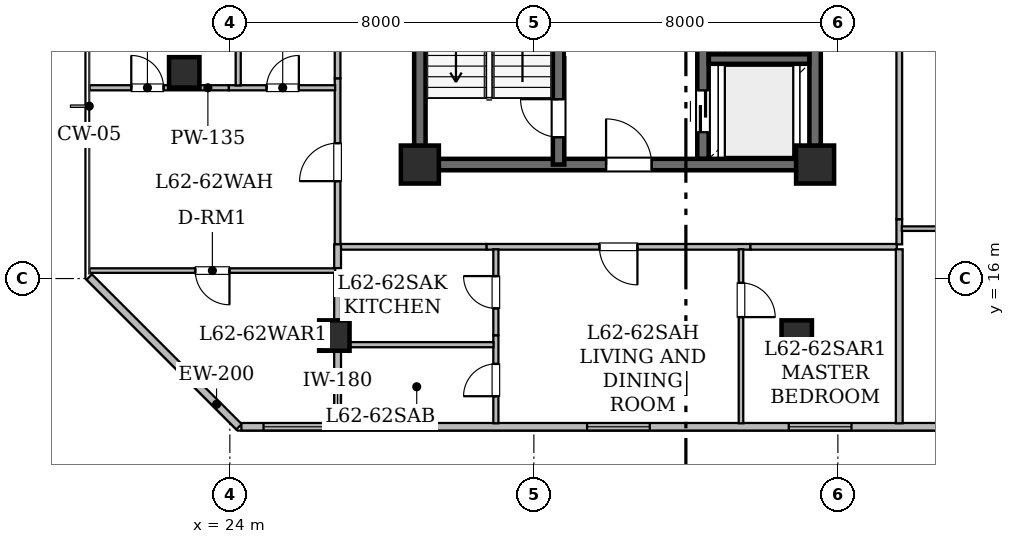
"""IFC4 building model, lengths in metres.
Left out: names, types, materials, properties, quantities, classifications, styles, units other than length and angle.
Written with IfcOpenShell. Run it as: python <this file> out.ifc"""

import sys

from ifc_helpers import new_model, si_unit, direction, frame, frame_2d, origin, origin_2d, place, context, subcontext, project, spatial, rectangle, hollow_rectangle, extrude, element, fill, save


model = new_model("IFC4")
c1 = context("Model", 3, precision=1e-05, world=origin(), true_north=direction((0.0, 1.0)))
c2 = subcontext(c1, "Body", "Model", "MODEL_VIEW")
j1 = project(units=[si_unit("LENGTHUNIT", "METRE"), si_unit("PLANEANGLEUNIT", "RADIAN")], contexts=[c1])
p1 = place(None, origin())
s1 = spatial("IfcSite", under=j1, at=p1, CompositionType="ELEMENT")
p2 = place(p1, origin())
s2 = spatial("IfcBuilding", under=s1, at=p2, CompositionType="ELEMENT")
p3 = place(p2, frame((0.0, 0.0, 242.75)))
s3 = spatial("IfcBuildingStorey", under=s2, at=p3, CompositionType="ELEMENT", Elevation=242.75)
for number, where, z_axis, x_axis in (
    (1, (29.0, 19.0, 0.0), (0.0, 0.0, 1.0), (1.0, 0.0, 0.0)),
    (2, (39.4, 19.0, 0.0), (0.0, 0.0, 1.0), (1.0, 0.0, 0.0)),
):
    element("IfcColumn", number, at=place(p3, frame(where, z_axis=z_axis, x_axis=x_axis)), inside=s3, PredefinedType="COLUMN", context=c2, shape_type="SweptSolid", body=[
        extrude(hollow_rectangle(XDim=1.0, YDim=1.0, WallThickness=0.05, at=origin_2d()), origin(), (0.0, 0.0, 1.0), 3.65),
    ])
for number, where, z_axis, x_axis in (
    (3, (26.75, 14.5, 0.0), (0.0, 0.0, 1.0), (1.0, 0.0, 0.0)),
    (4, (38.917, 14.5, 0.0), (0.0, 0.0, 1.0), (1.0, 0.0, 0.0)),
    (5, (22.8, 21.425, 0.0), (0.0, 0.0, 1.0), (1.0, 0.0, 0.0)),
):
    element("IfcColumn", number, at=place(p3, frame(where, z_axis=z_axis, x_axis=x_axis)), inside=s3, PredefinedType="COLUMN", context=c2, shape_type="SweptSolid", body=[
        extrude(hollow_rectangle(XDim=0.8, YDim=0.8, WallThickness=0.04, at=origin_2d()), origin(), (0.0, 0.0, 1.0), 3.65),
    ])
p4 = place(p3, frame((24.241, 12.1, 0.0), z_axis=(0.0, 0.0, 1.0), x_axis=(-0.707106781187, 0.707106781187, 0.0)))
e6 = element("IfcWall", 6, at=p4, inside=s3, PredefinedType="STANDARD", context=c2, shape_type="SweptSolid", body=[
    extrude(rectangle(XDim=5.573, YDim=0.2, at=frame_2d((2.787, 0.0))), origin(), (0.0, 0.0, 1.0), 3.43),
])
p5 = place(p3, frame((65.696, 12.1, 0.0), z_axis=(0.0, 0.0, 1.0), x_axis=(-1.0, 0.0, 0.0)))
e7 = element("IfcWall", 7, at=p5, inside=s3, PredefinedType="STANDARD", context=c2, shape_type="SweptSolid", body=[
    extrude(rectangle(XDim=41.393, YDim=0.2, at=frame_2d((20.697, 0.0))), origin(), (0.0, 0.0, 1.0), 3.43),
])
p6 = place(p5, frame((39.16, 0.0, 0.85)))
e8 = element("IfcOpeningElement", 8, at=p6, cuts=e7, PredefinedType="OPENING", context=c2, shape_type="SweptSolid", body=[
    extrude(rectangle(XDim=1.65, YDim=1.55, at=frame_2d((0.825, 0.775))), frame((0.0, 0.11, 0.0), z_axis=(0.0, -1.0, 0.0), x_axis=(1.0, 0.0, 0.0)), (0.0, 0.0, 1.0), 0.22),
])
p7 = place(p5, frame((30.646, 0.0, 0.85)))
e9 = element("IfcOpeningElement", 9, at=p7, cuts=e7, PredefinedType="OPENING", context=c2, shape_type="SweptSolid", body=[
    extrude(rectangle(XDim=1.65, YDim=1.55, at=frame_2d((0.825, 0.775))), frame((0.0, 0.11, 0.0), z_axis=(0.0, -1.0, 0.0), x_axis=(1.0, 0.0, 0.0)), (0.0, 0.0, 1.0), 0.22),
])
p8 = place(p5, frame((25.339, 0.0, 0.85)))
e10 = element("IfcOpeningElement", 10, at=p8, cuts=e7, PredefinedType="OPENING", context=c2, shape_type="SweptSolid", body=[
    extrude(rectangle(XDim=1.65, YDim=1.55, at=frame_2d((0.825, 0.775))), frame((0.0, 0.11, 0.0), z_axis=(0.0, -1.0, 0.0), x_axis=(1.0, 0.0, 0.0)), (0.0, 0.0, 1.0), 0.22),
])
p9 = place(p5, frame((15.596, 0.0, 0.8)))
e11 = element("IfcOpeningElement", 11, at=p9, cuts=e7, PredefinedType="OPENING", context=c2, shape_type="SweptSolid", body=[
    extrude(rectangle(XDim=1.2, YDim=1.5, at=frame_2d((0.6, 0.75))), frame((0.0, 0.11, 0.0), z_axis=(0.0, -1.0, 0.0), x_axis=(1.0, 0.0, 0.0)), (0.0, 0.0, 1.0), 0.22),
])
p10 = place(p5, frame((19.706, 0.0, 0.85)))
e12 = element("IfcOpeningElement", 12, at=p10, cuts=e7, PredefinedType="OPENING", context=c2, shape_type="SweptSolid", body=[
    extrude(rectangle(XDim=1.65, YDim=1.55, at=frame_2d((0.825, 0.775))), frame((0.0, 0.11, 0.0), z_axis=(0.0, -1.0, 0.0), x_axis=(1.0, 0.0, 0.0)), (0.0, 0.0, 1.0), 0.22),
])
p11 = place(p5, frame((11.036, 0.0, 0.85)))
e13 = element("IfcOpeningElement", 13, at=p11, cuts=e7, PredefinedType="OPENING", context=c2, shape_type="SweptSolid", body=[
    extrude(rectangle(XDim=1.65, YDim=1.55, at=frame_2d((0.825, 0.775))), frame((0.0, 0.11, 0.0), z_axis=(0.0, -1.0, 0.0), x_axis=(1.0, 0.0, 0.0)), (0.0, 0.0, 1.0), 0.22),
])
p12 = place(p5, frame((1.526, 0.0, 0.8)))
e14 = element("IfcOpeningElement", 14, at=p12, cuts=e7, PredefinedType="OPENING", context=c2, shape_type="SweptSolid", body=[
    extrude(rectangle(XDim=1.2, YDim=1.5, at=frame_2d((0.6, 0.75))), frame((0.0, 0.11, 0.0), z_axis=(0.0, -1.0, 0.0), x_axis=(1.0, 0.0, 0.0)), (0.0, 0.0, 1.0), 0.22),
])
p13 = place(p5, frame((4.786, 0.0, 0.85)))
e15 = element("IfcOpeningElement", 15, at=p13, cuts=e7, PredefinedType="OPENING", context=c2, shape_type="SweptSolid", body=[
    extrude(rectangle(XDim=1.65, YDim=1.55, at=frame_2d((0.825, 0.775))), frame((0.0, 0.11, 0.0), z_axis=(0.0, -1.0, 0.0), x_axis=(1.0, 0.0, 0.0)), (0.0, 0.0, 1.0), 0.22),
])
p14 = place(p3, frame((29.0, 19.0, 0.0), z_axis=(0.0, 0.0, 1.0), x_axis=(0.0, 1.0, 0.0)))
e16 = element("IfcWall", 16, at=p14, inside=s3, PredefinedType="SHEAR", context=c2, shape_type="SweptSolid", body=[
    extrude(rectangle(XDim=9.0, YDim=0.3, at=frame_2d((4.5, 0.0))), origin(), (0.0, 0.0, 1.0), 3.43),
])
p15 = place(p3, frame((29.0, 19.0, 0.0), z_axis=(0.0, 0.0, 1.0), x_axis=(1.0, 0.0, 0.0)))
e17 = element("IfcWall", 17, at=p15, inside=s3, PredefinedType="SHEAR", context=c2, shape_type="SweptSolid", body=[
    extrude(rectangle(XDim=10.4, YDim=0.3, at=frame_2d((5.2, 0.0))), origin(), (0.0, 0.0, 1.0), 3.43),
])
p16 = place(p15, frame((4.9, 0.0, 0.0)))
e18 = element("IfcOpeningElement", 18, at=p16, cuts=e17, PredefinedType="OPENING", context=c2, shape_type="SweptSolid", body=[
    extrude(rectangle(XDim=1.2, YDim=2.15, at=frame_2d((0.6, 1.075))), frame((0.0, 0.16, 0.0), z_axis=(0.0, -1.0, 0.0), x_axis=(1.0, 0.0, 0.0)), (0.0, 0.0, 1.0), 0.32),
])
p17 = place(p3, frame((39.4, 19.0, 0.0), z_axis=(0.0, 0.0, 1.0), x_axis=(0.0, 1.0, 0.0)))
e19 = element("IfcWall", 19, at=p17, inside=s3, PredefinedType="SHEAR", context=c2, shape_type="SweptSolid", body=[
    extrude(rectangle(XDim=5.4, YDim=0.3, at=frame_2d((2.7, 0.0))), origin(), (0.0, 0.0, 1.0), 3.43),
])
p18 = place(p3, frame((32.65, 19.0, 0.0), z_axis=(0.0, 0.0, 1.0), x_axis=(0.0, 1.0, 0.0)))
e20 = element("IfcWall", 20, at=p18, inside=s3, PredefinedType="SHEAR", context=c2, shape_type="SweptSolid", body=[
    extrude(rectangle(XDim=9.0, YDim=0.3, at=frame_2d((4.5, 0.0))), origin(), (0.0, 0.0, 1.0), 3.43),
])
p19 = place(p18, frame((0.72, 0.0, 0.0)))
e21 = element("IfcOpeningElement", 21, at=p19, cuts=e20, PredefinedType="OPENING", context=c2, shape_type="SweptSolid", body=[
    extrude(rectangle(XDim=1.0, YDim=2.15, at=frame_2d((0.5, 1.075))), frame((0.0, 0.16, 0.0), z_axis=(0.0, -1.0, 0.0), x_axis=(1.0, 0.0, 0.0)), (0.0, 0.0, 1.0), 0.32),
])
p20 = place(p3, frame((36.45, 19.154, 0.0), z_axis=(0.0, 0.0, 1.0), x_axis=(0.0, 1.0, 0.0)))
e22 = element("IfcWall", 22, at=p20, inside=s3, PredefinedType="SHEAR", context=c2, shape_type="SweptSolid", body=[
    extrude(rectangle(XDim=4.746, YDim=0.3, at=frame_2d((2.373, 0.0))), origin(), (0.0, 0.0, 1.0), 3.43),
])
p21 = place(p20, frame((0.696, 0.0, 0.0)))
e23 = element("IfcOpeningElement", 23, at=p21, cuts=e22, PredefinedType="OPENING", context=c2, shape_type="SweptSolid", body=[
    extrude(rectangle(XDim=1.1, YDim=2.15, at=frame_2d((0.55, 1.075))), frame((0.0, 0.16, 0.0), z_axis=(0.0, -1.0, 0.0), x_axis=(1.0, 0.0, 0.0)), (0.0, 0.0, 1.0), 0.32),
])
p22 = place(p20, frame((3.316, 0.0, 0.0)))
e24 = element("IfcOpeningElement", 24, at=p22, cuts=e22, PredefinedType="OPENING", context=c2, shape_type="SweptSolid", body=[
    extrude(rectangle(XDim=1.1, YDim=2.15, at=frame_2d((0.55, 1.075))), frame((0.0, 0.16, 0.0), z_axis=(0.0, -1.0, 0.0), x_axis=(1.0, 0.0, 0.0)), (0.0, 0.0, 1.0), 0.32),
])
p23 = place(p3, frame((36.604, 21.775, 0.0), z_axis=(0.0, 0.0, 1.0), x_axis=(1.0, 0.0, 0.0)))
e25 = element("IfcWall", 25, at=p23, inside=s3, PredefinedType="SHEAR", context=c2, shape_type="SweptSolid", body=[
    extrude(rectangle(XDim=2.642, YDim=0.25, at=frame_2d((1.321, 0.0))), origin(), (0.0, 0.0, 1.0), 3.43),
])
p24 = place(p3, frame((26.835, 16.9, 0.0), z_axis=(0.0, 0.0, 1.0), x_axis=(0.0, 1.0, 0.0)))
e26 = element("IfcWall", 26, at=p24, inside=s3, PredefinedType="STANDARD", context=c2, shape_type="SweptSolid", body=[
    extrude(rectangle(XDim=4.369, YDim=0.15, at=frame_2d((2.185, 0.0))), origin(), (0.0, 0.0, 1.0), 2.725),
])
p25 = place(p24, frame((1.663, 0.0, 0.0)))
e27 = element("IfcOpeningElement", 27, at=p25, cuts=e26, PredefinedType="OPENING", context=c2, shape_type="SweptSolid", body=[
    extrude(rectangle(XDim=1.0, YDim=2.15, at=frame_2d((0.5, 1.075))), frame((0.0, 0.085, 0.0), z_axis=(0.0, -1.0, 0.0), x_axis=(1.0, 0.0, 0.0)), (0.0, 0.0, 1.0), 0.17),
])
p26 = place(p3, frame((26.835, 21.269, 0.0), z_axis=(0.0, 0.0, 1.0), x_axis=(0.0, 1.0, 0.0)))
e28 = element("IfcWall", 28, at=p26, inside=s3, PredefinedType="STANDARD", context=c2, shape_type="SweptSolid", body=[
    extrude(rectangle(XDim=2.981, YDim=0.15, at=frame_2d((1.49, 0.0))), origin(), (0.0, 0.0, 1.0), 3.43),
])
p27 = place(p3, frame((37.699, 16.835, 0.0), z_axis=(0.0, 0.0, 1.0), x_axis=(-1.0, 0.0, 0.0)))
e29 = element("IfcWall", 29, at=p27, inside=s3, PredefinedType="STANDARD", context=c2, shape_type="SweptSolid", body=[
    extrude(rectangle(XDim=6.948, YDim=0.15, at=frame_2d((3.474, 0.0))), origin(), (0.0, 0.0, 1.0), 3.43),
])
p28 = place(p27, frame((2.974, 0.0, 0.0)))
e30 = element("IfcOpeningElement", 30, at=p28, cuts=e29, PredefinedType="OPENING", context=c2, shape_type="SweptSolid", body=[
    extrude(rectangle(XDim=1.0, YDim=2.15, at=frame_2d((0.5, 1.075))), frame((0.0, 0.085, 0.0), z_axis=(0.0, -1.0, 0.0), x_axis=(1.0, 0.0, 0.0)), (0.0, 0.0, 1.0), 0.17),
])
for number, where, z_axis, x_axis in (
    (31, (30.751, 16.835, 0.0), (0.0, 0.0, 1.0), (-1.0, 0.0, 0.0)),
    (32, (41.55, 16.835, 0.0), (0.0, 0.0, 1.0), (-1.0, 0.0, 0.0)),
):
    element("IfcWall", number, at=place(p3, frame(where, z_axis=z_axis, x_axis=x_axis)), inside=s3, PredefinedType="STANDARD", context=c2, shape_type="SweptSolid", body=[
        extrude(rectangle(XDim=3.851, YDim=0.15, at=frame_2d((1.926, 0.0))), origin(), (0.0, 0.0, 1.0), 2.725),
    ])
p29 = place(p3, frame((41.615, 17.562, 0.0), z_axis=(0.0, 0.0, 1.0), x_axis=(0.0, -1.0, 0.0)))
e33 = element("IfcWall", 33, at=p29, inside=s3, PredefinedType="STANDARD", context=c2, shape_type="SweptSolid", body=[
    extrude(rectangle(XDim=0.662, YDim=0.15, at=frame_2d((0.331, 0.0))), origin(), (0.0, 0.0, 1.0), 3.43),
])
p30 = place(p3, frame((41.615, 23.476, 0.0), z_axis=(0.0, 0.0, 1.0), x_axis=(0.0, -1.0, 0.0)))
e34 = element("IfcWall", 34, at=p30, inside=s3, PredefinedType="STANDARD", context=c2, shape_type="SweptSolid", body=[
    extrude(rectangle(XDim=5.914, YDim=0.15, at=frame_2d((2.957, 0.0))), origin(), (0.0, 0.0, 1.0), 2.725),
])
p31 = place(p3, frame((23.971, 21.02, 0.0), z_axis=(0.0, 0.0, 1.0), x_axis=(1.0, 0.0, 0.0)))
e35 = element("IfcWall", 35, at=p31, inside=s3, PredefinedType="PARTITIONING", context=c2, shape_type="SweptSolid", body=[
    extrude(rectangle(XDim=2.799, YDim=0.135, at=frame_2d((1.399, 0.0))), origin(), (0.0, 0.0, 1.0), 2.725),
])
p32 = place(p31, frame((0.995, 0.0, 0.0)))
e36 = element("IfcOpeningElement", 36, at=p32, cuts=e35, PredefinedType="OPENING", context=c2, shape_type="SweptSolid", body=[
    extrude(rectangle(XDim=0.85, YDim=2.1, at=frame_2d((0.425, 1.05))), frame((0.0, 0.077, 0.0), z_axis=(0.0, -1.0, 0.0), x_axis=(1.0, 0.0, 0.0)), (0.0, 0.0, 1.0), 0.155),
])
p33 = place(p3, frame((20.31, 21.02, 0.0), z_axis=(0.0, 0.0, 1.0), x_axis=(1.0, 0.0, 0.0)))
e37 = element("IfcWall", 37, at=p33, inside=s3, PredefinedType="PARTITIONING", context=c2, shape_type="SweptSolid", body=[
    extrude(rectangle(XDim=3.661, YDim=0.135, at=frame_2d((1.831, 0.0))), origin(), (0.0, 0.0, 1.0), 2.725),
])
p34 = place(p33, frame((1.096, 0.0, 0.0)))
e38 = element("IfcOpeningElement", 38, at=p34, cuts=e37, PredefinedType="OPENING", context=c2, shape_type="SweptSolid", body=[
    extrude(rectangle(XDim=0.85, YDim=2.1, at=frame_2d((0.425, 1.05))), frame((0.0, 0.077, 0.0), z_axis=(0.0, -1.0, 0.0), x_axis=(1.0, 0.0, 0.0)), (0.0, 0.0, 1.0), 0.155),
])
p35 = place(p3, frame((26.77, 16.21, 0.0), z_axis=(0.0, 0.0, 1.0), x_axis=(-1.0, 0.0, 0.0)))
e39 = element("IfcWall", 39, at=p35, inside=s3, PredefinedType="PARTITIONING", context=c2, shape_type="SweptSolid", body=[
    extrude(rectangle(XDim=6.46, YDim=0.12, at=frame_2d((3.23, 0.0))), origin(), (0.0, 0.0, 1.0), 2.887),
])
p36 = place(p35, frame((2.78, 0.0, 0.0)))
e40 = element("IfcOpeningElement", 40, at=p36, cuts=e39, PredefinedType="OPENING", context=c2, shape_type="SweptSolid", body=[
    extrude(rectangle(XDim=0.9, YDim=2.1, at=frame_2d((0.45, 1.05))), frame((0.0, 0.07, 0.0), z_axis=(0.0, -1.0, 0.0), x_axis=(1.0, 0.0, 0.0)), (0.0, 0.0, 1.0), 0.14),
])
p37 = place(p3, frame((26.835, 16.9, 0.0), z_axis=(0.0, 0.0, 1.0), x_axis=(0.0, -1.0, 0.0)))
e41 = element("IfcWall", 41, at=p37, inside=s3, PredefinedType="STANDARD", context=c2, shape_type="SweptSolid", body=[
    extrude(rectangle(XDim=0.625, YDim=0.18, at=frame_2d((0.312, 0.0))), origin(), (0.0, 0.0, 1.0), 3.43),
])
p38 = place(p3, frame((24.22, 21.081, 0.0), z_axis=(0.0, 0.0, 1.0), x_axis=(0.0, 1.0, 0.0)))
e42 = element("IfcWall", 42, at=p38, inside=s3, PredefinedType="PARTITIONING", context=c2, shape_type="SweptSolid", body=[
    extrude(rectangle(XDim=3.037, YDim=0.135, at=frame_2d((1.519, 0.0))), origin(), (0.0, 0.0, 1.0), 3.43),
])
p39 = place(p3, frame((26.835, 14.509, 0.0), z_axis=(0.0, 0.0, 1.0), x_axis=(0.0, -1.0, 0.0)))
e43 = element("IfcWall", 43, at=p39, inside=s3, PredefinedType="STANDARD", context=c2, shape_type="SweptSolid", body=[
    extrude(rectangle(XDim=2.317, YDim=0.18, at=frame_2d((1.159, 0.0))), origin(), (0.0, 0.0, 1.0), 2.725),
])
p40 = place(p3, frame((26.835, 16.145, 0.0), z_axis=(0.0, 0.0, 1.0), x_axis=(0.0, -1.0, 0.0)))
e44 = element("IfcWall", 44, at=p40, inside=s3, PredefinedType="STANDARD", context=c2, shape_type="SweptSolid", body=[
    extrude(rectangle(XDim=1.636, YDim=0.18, at=frame_2d((0.818, 0.0))), origin(), (0.0, 0.0, 1.0), 2.725),
])
p41 = place(p3, frame((31.0, 12.192, 0.0), z_axis=(0.0, 0.0, 1.0), x_axis=(0.0, 1.0, 0.0)))
e45 = element("IfcWall", 45, at=p41, inside=s3, PredefinedType="PARTITIONING", context=c2, shape_type="SweptSolid", body=[
    extrude(rectangle(XDim=2.317, YDim=0.135, at=frame_2d((1.159, 0.0))), origin(), (0.0, 0.0, 1.0), 2.887),
])
p42 = place(p41, frame((0.712, 0.0, 0.0)))
e46 = element("IfcOpeningElement", 46, at=p42, cuts=e45, PredefinedType="OPENING", context=c2, shape_type="SweptSolid", body=[
    extrude(rectangle(XDim=0.85, YDim=2.1, at=frame_2d((0.425, 1.05))), frame((0.0, 0.077, 0.0), z_axis=(0.0, -1.0, 0.0), x_axis=(1.0, 0.0, 0.0)), (0.0, 0.0, 1.0), 0.155),
])
p43 = place(p3, frame((31.0, 14.509, 0.0), z_axis=(0.0, 0.0, 1.0), x_axis=(0.0, 1.0, 0.0)))
e47 = element("IfcWall", 47, at=p43, inside=s3, PredefinedType="PARTITIONING", context=c2, shape_type="SweptSolid", body=[
    extrude(rectangle(XDim=2.261, YDim=0.135, at=frame_2d((1.13, 0.0))), origin(), (0.0, 0.0, 1.0), 2.887),
])
p44 = place(p43, frame((0.706, 0.0, 0.0)))
e48 = element("IfcOpeningElement", 48, at=p44, cuts=e47, PredefinedType="OPENING", context=c2, shape_type="SweptSolid", body=[
    extrude(rectangle(XDim=0.85, YDim=2.1, at=frame_2d((0.425, 1.05))), frame((0.0, 0.077, 0.0), z_axis=(0.0, -1.0, 0.0), x_axis=(1.0, 0.0, 0.0)), (0.0, 0.0, 1.0), 0.155),
])
p45 = place(p3, frame((37.45, 16.77, 0.0), z_axis=(0.0, 0.0, 1.0), x_axis=(0.0, -1.0, 0.0)))
e49 = element("IfcWall", 49, at=p45, inside=s3, PredefinedType="PARTITIONING", context=c2, shape_type="SweptSolid", body=[
    extrude(rectangle(XDim=4.578, YDim=0.12, at=frame_2d((2.289, 0.0))), origin(), (0.0, 0.0, 1.0), 2.887),
])
p46 = place(p45, frame((0.884, 0.0, 0.0)))
e50 = element("IfcOpeningElement", 50, at=p46, cuts=e49, PredefinedType="OPENING", context=c2, shape_type="SweptSolid", body=[
    extrude(rectangle(XDim=0.9, YDim=2.1, at=frame_2d((0.45, 1.05))), frame((0.0, 0.07, 0.0), z_axis=(0.0, -1.0, 0.0), x_axis=(1.0, 0.0, 0.0)), (0.0, 0.0, 1.0), 0.14),
])
p47 = place(p3, frame((26.917, 14.26, 0.0), z_axis=(0.0, 0.0, 1.0), x_axis=(1.0, 0.0, 0.0)))
e51 = element("IfcWall", 51, at=p47, inside=s3, PredefinedType="PARTITIONING", context=c2, shape_type="SweptSolid", body=[
    extrude(rectangle(XDim=4.022, YDim=0.135, at=frame_2d((2.011, 0.0))), origin(), (0.0, 0.0, 1.0), 2.887),
])
p48 = place(p3, frame((41.615, 16.77, 0.0), z_axis=(0.0, 0.0, 1.0), x_axis=(0.0, -1.0, 0.0)))
e52 = element("IfcWall", 52, at=p48, inside=s3, PredefinedType="STANDARD", context=c2, shape_type="SweptSolid", body=[
    extrude(rectangle(XDim=4.578, YDim=0.18, at=frame_2d((2.289, 0.0))), origin(), (0.0, 0.0, 1.0), 2.887),
])
p49 = place(p3, frame((41.682, 17.313, 0.0), z_axis=(0.0, 0.0, 1.0), x_axis=(1.0, 0.0, 0.0)))
e53 = element("IfcWall", 53, at=p49, inside=s3, PredefinedType="PARTITIONING", context=c2, shape_type="SweptSolid", body=[
    extrude(rectangle(XDim=6.979, YDim=0.12, at=frame_2d((3.49, 0.0))), origin(), (0.0, 0.0, 1.0), 2.725),
])
p50 = place(p6, origin())
e54 = element("IfcWindow", 54, at=p50, inside=s3, PartitioningType="SINGLE_PANEL", PredefinedType="WINDOW", context=c2, shape_type="SweptSolid", body=[
    extrude(rectangle(XDim=1.65, YDim=1.55, at=frame_2d((0.825, 0.775))), frame((0.0, 0.03, 0.0), z_axis=(0.0, -1.0, 0.0), x_axis=(1.0, 0.0, 0.0)), (0.0, 0.0, 1.0), 0.06),
])
fill(e8, e54)
p51 = place(p7, origin())
e55 = element("IfcWindow", 55, at=p51, inside=s3, PartitioningType="SINGLE_PANEL", PredefinedType="WINDOW", context=c2, shape_type="SweptSolid", body=[
    extrude(rectangle(XDim=1.65, YDim=1.55, at=frame_2d((0.825, 0.775))), frame((0.0, 0.03, 0.0), z_axis=(0.0, -1.0, 0.0), x_axis=(1.0, 0.0, 0.0)), (0.0, 0.0, 1.0), 0.06),
])
fill(e9, e55)
p52 = place(p8, origin())
e56 = element("IfcWindow", 56, at=p52, inside=s3, PartitioningType="SINGLE_PANEL", PredefinedType="WINDOW", context=c2, shape_type="SweptSolid", body=[
    extrude(rectangle(XDim=1.65, YDim=1.55, at=frame_2d((0.825, 0.775))), frame((0.0, 0.03, 0.0), z_axis=(0.0, -1.0, 0.0), x_axis=(1.0, 0.0, 0.0)), (0.0, 0.0, 1.0), 0.06),
])
fill(e10, e56)
p53 = place(p19, origin())
e57 = element("IfcDoor", 57, at=p53, inside=s3, OperationType="SINGLE_SWING_RIGHT", PredefinedType="DOOR", context=c2, shape_type="SweptSolid", body=[
    extrude(rectangle(XDim=1.0, YDim=2.15, at=frame_2d((0.5, 1.075))), frame((0.0, 0.025, 0.0), z_axis=(0.0, -1.0, 0.0), x_axis=(1.0, 0.0, 0.0)), (0.0, 0.0, 1.0), 0.05),
])
fill(e21, e57)
p54 = place(p16, origin())
e58 = element("IfcDoor", 58, at=p54, inside=s3, OperationType="SINGLE_SWING_LEFT", PredefinedType="DOOR", context=c2, shape_type="SweptSolid", body=[
    extrude(rectangle(XDim=1.2, YDim=2.15, at=frame_2d((0.6, 1.075))), frame((0.0, 0.025, 0.0), z_axis=(0.0, -1.0, 0.0), x_axis=(1.0, 0.0, 0.0)), (0.0, 0.0, 1.0), 0.05),
])
fill(e18, e58)
p55 = place(p21, origin())
e59 = element("IfcDoor", 59, at=p55, inside=s3, OperationType="SLIDING_TO_LEFT", PredefinedType="DOOR", context=c2, shape_type="SweptSolid", body=[
    extrude(rectangle(XDim=1.1, YDim=2.15, at=frame_2d((0.55, 1.075))), frame((0.0, 0.025, 0.0), z_axis=(0.0, -1.0, 0.0), x_axis=(1.0, 0.0, 0.0)), (0.0, 0.0, 1.0), 0.05),
])
fill(e23, e59)
p56 = place(p25, origin())
e60 = element("IfcDoor", 60, at=p56, inside=s3, OperationType="SINGLE_SWING_LEFT", PredefinedType="DOOR", context=c2, shape_type="SweptSolid", body=[
    extrude(rectangle(XDim=1.0, YDim=2.15, at=frame_2d((0.5, 1.075))), frame((0.0, 0.025, 0.0), z_axis=(0.0, -1.0, 0.0), x_axis=(1.0, 0.0, 0.0)), (0.0, 0.0, 1.0), 0.05),
])
fill(e27, e60)
p57 = place(p28, origin())
e61 = element("IfcDoor", 61, at=p57, inside=s3, OperationType="SINGLE_SWING_LEFT", PredefinedType="DOOR", context=c2, shape_type="SweptSolid", body=[
    extrude(rectangle(XDim=1.0, YDim=2.15, at=frame_2d((0.5, 1.075))), frame((0.0, 0.025, 0.0), z_axis=(0.0, -1.0, 0.0), x_axis=(1.0, 0.0, 0.0)), (0.0, 0.0, 1.0), 0.05),
])
fill(e30, e61)
p58 = place(p32, origin())
e62 = element("IfcDoor", 62, at=p58, inside=s3, OperationType="SINGLE_SWING_RIGHT", PredefinedType="DOOR", context=c2, shape_type="SweptSolid", body=[
    extrude(rectangle(XDim=0.85, YDim=2.1, at=frame_2d((0.425, 1.05))), frame((0.0, 0.025, 0.0), z_axis=(0.0, -1.0, 0.0), x_axis=(1.0, 0.0, 0.0)), (0.0, 0.0, 1.0), 0.05),
])
fill(e36, e62)
p59 = place(p34, origin())
e63 = element("IfcDoor", 63, at=p59, inside=s3, OperationType="SINGLE_SWING_LEFT", PredefinedType="DOOR", context=c2, shape_type="SweptSolid", body=[
    extrude(rectangle(XDim=0.85, YDim=2.1, at=frame_2d((0.425, 1.05))), frame((0.0, 0.025, 0.0), z_axis=(0.0, -1.0, 0.0), x_axis=(1.0, 0.0, 0.0)), (0.0, 0.0, 1.0), 0.05),
])
fill(e38, e63)
p60 = place(p36, origin())
e64 = element("IfcDoor", 64, at=p60, inside=s3, OperationType="SINGLE_SWING_LEFT", PredefinedType="DOOR", context=c2, shape_type="SweptSolid", body=[
    extrude(rectangle(XDim=0.9, YDim=2.1, at=frame_2d((0.45, 1.05))), frame((0.0, 0.025, 0.0), z_axis=(0.0, -1.0, 0.0), x_axis=(1.0, 0.0, 0.0)), (0.0, 0.0, 1.0), 0.05),
])
fill(e40, e64)
p61 = place(p42, origin())
e65 = element("IfcDoor", 65, at=p61, inside=s3, OperationType="SINGLE_SWING_LEFT", PredefinedType="DOOR", context=c2, shape_type="SweptSolid", body=[
    extrude(rectangle(XDim=0.85, YDim=2.1, at=frame_2d((0.425, 1.05))), frame((0.0, 0.025, 0.0), z_axis=(0.0, -1.0, 0.0), x_axis=(1.0, 0.0, 0.0)), (0.0, 0.0, 1.0), 0.05),
])
fill(e46, e65)
p62 = place(p44, origin())
e66 = element("IfcDoor", 66, at=p62, inside=s3, OperationType="SINGLE_SWING_RIGHT", PredefinedType="DOOR", context=c2, shape_type="SweptSolid", body=[
    extrude(rectangle(XDim=0.85, YDim=2.1, at=frame_2d((0.425, 1.05))), frame((0.0, 0.025, 0.0), z_axis=(0.0, -1.0, 0.0), x_axis=(1.0, 0.0, 0.0)), (0.0, 0.0, 1.0), 0.05),
])
fill(e48, e66)
p63 = place(p46, origin())
e67 = element("IfcDoor", 67, at=p63, inside=s3, OperationType="SINGLE_SWING_RIGHT", PredefinedType="DOOR", context=c2, shape_type="SweptSolid", body=[
    extrude(rectangle(XDim=0.9, YDim=2.1, at=frame_2d((0.45, 1.05))), frame((0.0, 0.025, 0.0), z_axis=(0.0, -1.0, 0.0), x_axis=(1.0, 0.0, 0.0)), (0.0, 0.0, 1.0), 0.05),
])
fill(e50, e67)
save(model, sys.argv[1])
